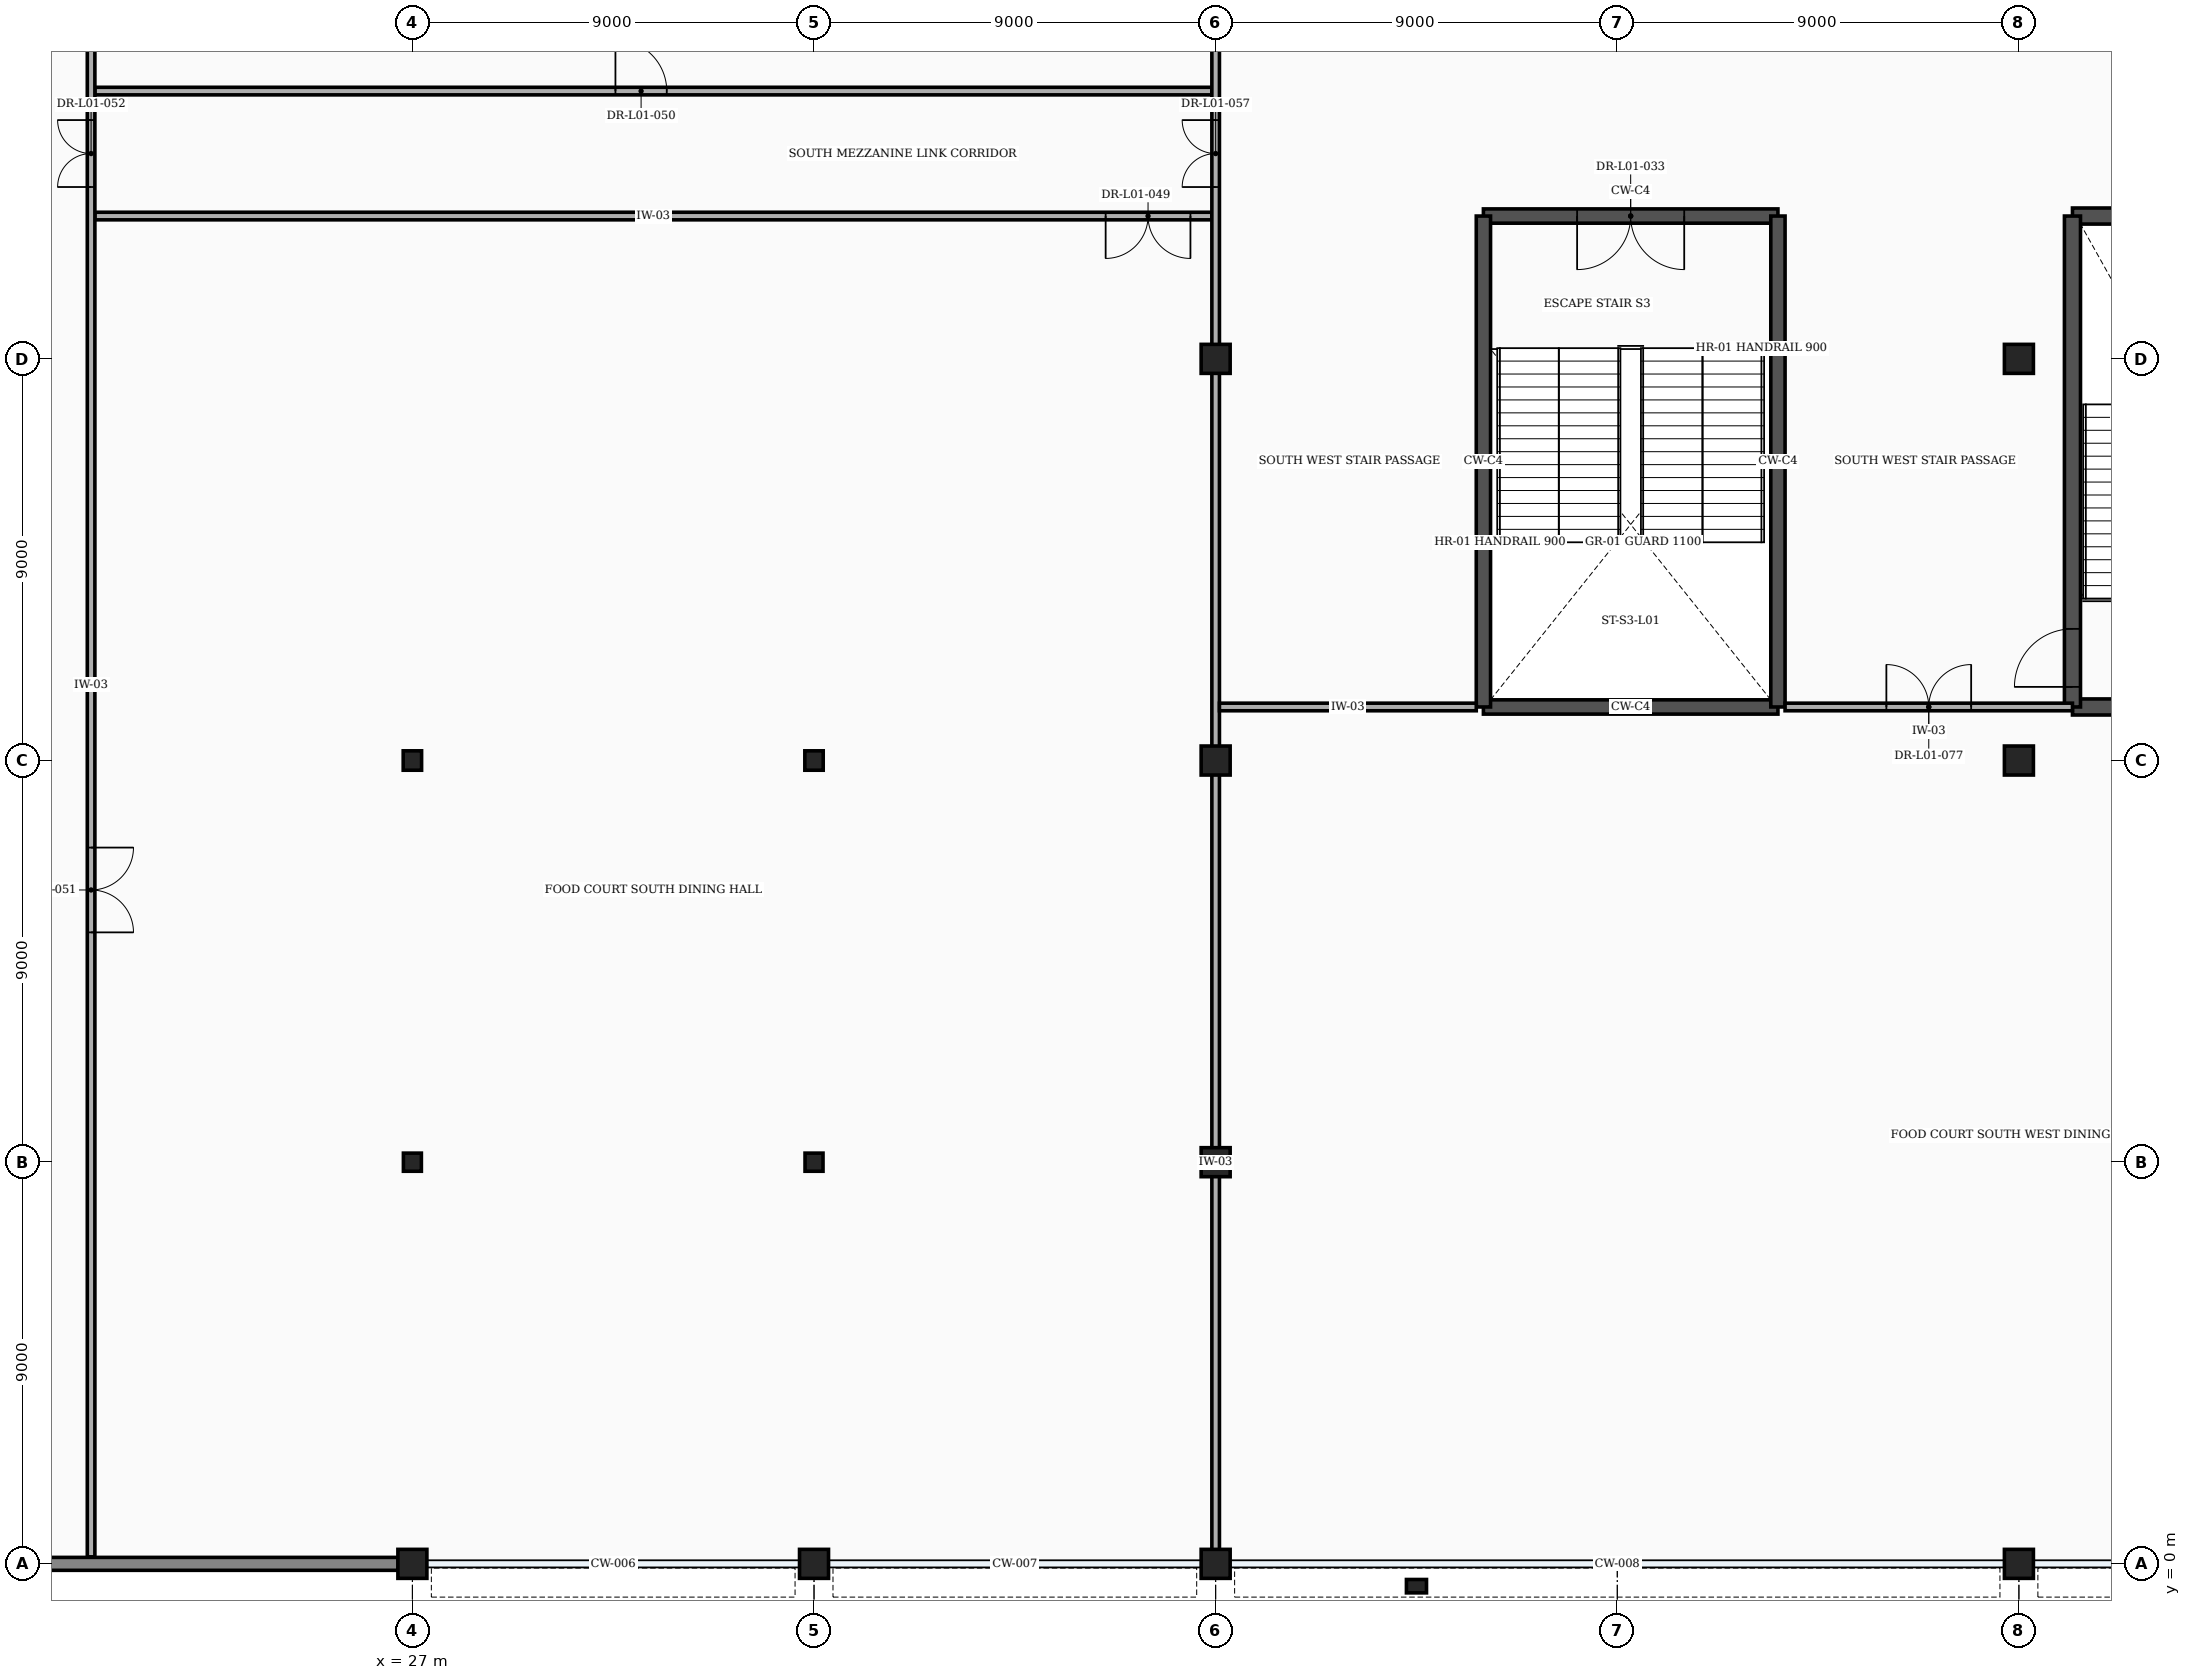
"""IFC4 building model, lengths in metres.
Left out: names, types, materials, properties, quantities, classifications, styles, units other than length and angle.
Written with IfcOpenShell. Run it as: python <this file> out.ifc"""

import sys

from ifc_helpers import new_model, si_unit, direction, frame, frame_2d, origin, origin_2d, place, context, subcontext, project, spatial, rectangle, i_section, extrude, element, fill, save


model = new_model("IFC4")
c1 = context("Model", 3, precision=1e-05, world=origin(), true_north=direction((0.0, 1.0)))
c2 = subcontext(c1, "Body", "Model", "MODEL_VIEW")
j1 = project(units=[si_unit("LENGTHUNIT", "METRE"), si_unit("PLANEANGLEUNIT", "RADIAN")], contexts=[c1])
p1 = place(None, origin())
s1 = spatial("IfcSite", under=j1, at=p1, CompositionType="ELEMENT")
p2 = place(p1, origin())
s2 = spatial("IfcBuilding", under=s1, at=p2, CompositionType="ELEMENT")
p3 = place(p2, frame((0.0, 0.0, 6.0)))
s3 = spatial("IfcBuildingStorey", under=s2, at=p3, CompositionType="ELEMENT", Elevation=6.0)
p4 = place(p3, frame((27.0, 0.0, 0.0), z_axis=(0.0, 0.0, 1.0), x_axis=(1.0, 0.0, 0.0)))
e1 = element("IfcColumn", 1, at=p4, inside=s3, PredefinedType="COLUMN", context=c2, shape_type="SweptSolid", body=[
    extrude(rectangle(XDim=0.65, YDim=0.65, at=origin_2d()), origin(), (0.0, 0.0, 1.0), 5.4),
])
p5 = place(p3, frame((27.0, 9.0, 0.0), z_axis=(0.0, 0.0, 1.0), x_axis=(1.0, 0.0, 0.0)))
e2 = element("IfcColumn", 2, at=p5, inside=s3, PredefinedType="COLUMN", context=c2, shape_type="SweptSolid", body=[
    extrude(i_section(OverallWidth=0.403, OverallDepth=0.406, WebThickness=0.027, FlangeThickness=0.043, at=origin_2d()), origin(), (0.0, 0.0, 1.0), 5.4),
])
p6 = place(p3, frame((27.0, 18.0, 0.0), z_axis=(0.0, 0.0, 1.0), x_axis=(1.0, 0.0, 0.0)))
e3 = element("IfcColumn", 3, at=p6, inside=s3, PredefinedType="COLUMN", context=c2, shape_type="SweptSolid", body=[
    extrude(i_section(OverallWidth=0.412, OverallDepth=0.435, WebThickness=0.036, FlangeThickness=0.058, at=origin_2d()), origin(), (0.0, 0.0, 1.0), 5.4),
])
p7 = place(p3, frame((36.0, 0.0, 0.0), z_axis=(0.0, 0.0, 1.0), x_axis=(1.0, 0.0, 0.0)))
e4 = element("IfcColumn", 4, at=p7, inside=s3, PredefinedType="COLUMN", context=c2, shape_type="SweptSolid", body=[
    extrude(rectangle(XDim=0.65, YDim=0.65, at=origin_2d()), origin(), (0.0, 0.0, 1.0), 5.4),
])
p8 = place(p3, frame((36.0, 9.0, 0.0), z_axis=(0.0, 0.0, 1.0), x_axis=(1.0, 0.0, 0.0)))
e5 = element("IfcColumn", 5, at=p8, inside=s3, PredefinedType="COLUMN", context=c2, shape_type="SweptSolid", body=[
    extrude(i_section(OverallWidth=0.403, OverallDepth=0.406, WebThickness=0.027, FlangeThickness=0.043, at=origin_2d()), origin(), (0.0, 0.0, 1.0), 5.4),
])
p9 = place(p3, frame((36.0, 18.0, 0.0), z_axis=(0.0, 0.0, 1.0), x_axis=(1.0, 0.0, 0.0)))
e6 = element("IfcColumn", 6, at=p9, inside=s3, PredefinedType="COLUMN", context=c2, shape_type="SweptSolid", body=[
    extrude(i_section(OverallWidth=0.412, OverallDepth=0.435, WebThickness=0.036, FlangeThickness=0.058, at=origin_2d()), origin(), (0.0, 0.0, 1.0), 5.4),
])
for number, where, z_axis, x_axis in (
    (7, (45.0, 0.0, 0.0), (0.0, 0.0, 1.0), (1.0, 0.0, 0.0)),
    (8, (45.0, 9.0, 0.0), (0.0, 0.0, 1.0), (1.0, 0.0, 0.0)),
    (9, (45.0, 18.0, 0.0), (0.0, 0.0, 1.0), (1.0, 0.0, 0.0)),
    (10, (45.0, 27.0, 0.0), (0.0, 0.0, 1.0), (1.0, 0.0, 0.0)),
    (11, (63.0, 0.0, 0.0), (0.0, 0.0, 1.0), (1.0, 0.0, 0.0)),
    (12, (63.0, 18.0, 0.0), (0.0, 0.0, 1.0), (1.0, 0.0, 0.0)),
    (13, (63.0, 27.0, 0.0), (0.0, 0.0, 1.0), (1.0, 0.0, 0.0)),
):
    element("IfcColumn", number, at=place(p3, frame(where, z_axis=z_axis, x_axis=x_axis)), inside=s3, PredefinedType="COLUMN", context=c2, shape_type="SweptSolid", body=[
        extrude(rectangle(XDim=0.65, YDim=0.65, at=origin_2d()), origin(), (0.0, 0.0, 1.0), 5.4),
    ])
p10 = place(p3, frame((49.5, -0.5, 0.0), z_axis=(0.0, 0.0, 1.0), x_axis=(1.0, 0.0, 0.0)))
e14 = element("IfcColumn", 14, at=p10, inside=s3, PredefinedType="PILASTER", context=c2, shape_type="SweptSolid", body=[
    extrude(rectangle(XDim=0.45, YDim=0.3, at=origin_2d()), origin(), (0.0, 0.0, 1.0), 5.4),
])
p11 = place(p3, frame((9.317, 0.0, 0.0), z_axis=(0.0, 0.0, 1.0), x_axis=(1.0, 0.0, 0.0)))
e15 = element("IfcWall", 15, at=p11, inside=s3, PredefinedType="STANDARD", context=c2, shape_type="SweptSolid", body=[
    extrude(rectangle(XDim=17.366, YDim=0.29, at=frame_2d((8.683, 0.0))), origin(), (0.0, 0.0, 1.0), 4.388),
])
p12 = place(p11, frame((0.65, 0.0, 0.85)))
e16 = element("IfcOpeningElement", 16, at=p12, cuts=e15, PredefinedType="OPENING", context=c2, shape_type="SweptSolid", body=[
    extrude(rectangle(XDim=2.4, YDim=2.6, at=frame_2d((1.2, 1.3))), frame((0.0, 0.157, 0.0), z_axis=(0.0, -1.0, 0.0), x_axis=(1.0, 0.0, 0.0)), (0.0, 0.0, 1.0), 0.314),
])
for number, where, z_axis, x_axis in (
    (17, (64.2, 19.2, 0.0), (0.0, 0.0, 1.0), (1.0, 0.0, 0.0)),
    (18, (64.2, 30.2, 0.0), (0.0, 0.0, 1.0), (1.0, 0.0, 0.0)),
):
    element("IfcWall", number, at=place(p3, frame(where, z_axis=z_axis, x_axis=x_axis)), inside=s3, PredefinedType="SHEAR", context=c2, shape_type="SweptSolid", body=[
        extrude(rectangle(XDim=6.6, YDim=0.36, at=frame_2d((3.3, 0.0))), origin(), (0.0, 0.0, 1.0), 5.15),
    ])
p13 = place(p3, frame((64.2, 19.2, 0.0), z_axis=(0.0, 0.0, 1.0), x_axis=(0.0, 1.0, 0.0)))
e19 = element("IfcWall", 19, at=p13, inside=s3, PredefinedType="SHEAR", context=c2, shape_type="SweptSolid", body=[
    extrude(rectangle(XDim=11.0, YDim=0.36, at=frame_2d((5.5, 0.0))), origin(), (0.0, 0.0, 1.0), 5.15),
])
p14 = place(p13, frame((0.45, 0.0, 0.0)))
e20 = element("IfcOpeningElement", 20, at=p14, cuts=e19, PredefinedType="OPENING", context=c2, shape_type="SweptSolid", body=[
    extrude(rectangle(XDim=1.3, YDim=2.2, at=frame_2d((0.65, 1.1))), frame((0.0, 0.192, 0.0), z_axis=(0.0, -1.0, 0.0), x_axis=(1.0, 0.0, 0.0)), (0.0, 0.0, 1.0), 0.384),
])
p15 = place(p3, frame((51.0, 19.2, 0.0), z_axis=(0.0, 0.0, 1.0), x_axis=(1.0, 0.0, 0.0)))
e21 = element("IfcWall", 21, at=p15, inside=s3, PredefinedType="SHEAR", context=c2, shape_type="SweptSolid", body=[
    extrude(rectangle(XDim=6.6, YDim=0.32, at=frame_2d((3.3, 0.0))), origin(), (0.0, 0.0, 1.0), 5.15),
])
p16 = place(p3, frame((51.0, 30.2, 0.0), z_axis=(0.0, 0.0, 1.0), x_axis=(1.0, 0.0, 0.0)))
e22 = element("IfcWall", 22, at=p16, inside=s3, PredefinedType="SHEAR", context=c2, shape_type="SweptSolid", body=[
    extrude(rectangle(XDim=6.6, YDim=0.32, at=frame_2d((3.3, 0.0))), origin(), (0.0, 0.0, 1.0), 5.15),
])
p17 = place(p16, frame((2.1, 0.0, 0.0)))
e23 = element("IfcOpeningElement", 23, at=p17, cuts=e22, PredefinedType="OPENING", context=c2, shape_type="SweptSolid", body=[
    extrude(rectangle(XDim=2.4, YDim=2.25, at=frame_2d((1.2, 1.125))), frame((0.0, 0.172, 0.0), z_axis=(0.0, -1.0, 0.0), x_axis=(1.0, 0.0, 0.0)), (0.0, 0.0, 1.0), 0.344),
])
for number, where, z_axis, x_axis in (
    (24, (51.0, 19.2, 0.0), (0.0, 0.0, 1.0), (0.0, 1.0, 0.0)),
    (25, (57.6, 19.2, 0.0), (0.0, 0.0, 1.0), (0.0, 1.0, 0.0)),
):
    element("IfcWall", number, at=place(p3, frame(where, z_axis=z_axis, x_axis=x_axis)), inside=s3, PredefinedType="SHEAR", context=c2, shape_type="SweptSolid", body=[
        extrude(rectangle(XDim=11.0, YDim=0.32, at=frame_2d((5.5, 0.0))), origin(), (0.0, 0.0, 1.0), 5.15),
    ])
p18 = place(p3, frame((19.885, 30.2, 0.0), z_axis=(0.0, 0.0, 1.0), x_axis=(1.0, 0.0, 0.0)))
e26 = element("IfcWall", 26, at=p18, inside=s3, PredefinedType="PARTITIONING", context=c2, shape_type="SweptSolid", body=[
    extrude(rectangle(XDim=25.03, YDim=0.17, at=frame_2d((12.515, 0.0))), origin(), (0.0, 0.0, 1.0), 5.15),
])
p19 = place(p18, frame((22.65, 0.0, 0.0)))
e27 = element("IfcOpeningElement", 27, at=p19, cuts=e26, PredefinedType="OPENING", context=c2, shape_type="SweptSolid", body=[
    extrude(rectangle(XDim=1.9, YDim=2.35, at=frame_2d((0.95, 1.175))), frame((0.0, 0.097, 0.0), z_axis=(0.0, -1.0, 0.0), x_axis=(1.0, 0.0, 0.0)), (0.0, 0.0, 1.0), 0.194),
])
p20 = place(p3, frame((19.885, 33.0, 0.0), z_axis=(0.0, 0.0, 1.0), x_axis=(1.0, 0.0, 0.0)))
e28 = element("IfcWall", 28, at=p20, inside=s3, PredefinedType="PARTITIONING", context=c2, shape_type="SweptSolid", body=[
    extrude(rectangle(XDim=25.03, YDim=0.17, at=frame_2d((12.515, 0.0))), origin(), (0.0, 0.0, 1.0), 5.15),
])
p21 = place(p20, frame((11.665, 0.0, 0.0)))
e29 = element("IfcOpeningElement", 29, at=p21, cuts=e28, PredefinedType="OPENING", context=c2, shape_type="SweptSolid", body=[
    extrude(rectangle(XDim=1.15, YDim=2.15, at=frame_2d((0.575, 1.075))), frame((0.0, 0.097, 0.0), z_axis=(0.0, -1.0, 0.0), x_axis=(1.0, 0.0, 0.0)), (0.0, 0.0, 1.0), 0.194),
])
p22 = place(p3, frame((19.8, 0.157, 0.0), z_axis=(0.0, 0.0, 1.0), x_axis=(0.0, 1.0, 0.0)))
e30 = element("IfcWall", 30, at=p22, inside=s3, PredefinedType="PARTITIONING", context=c2, shape_type="SweptSolid", body=[
    extrude(rectangle(XDim=39.083, YDim=0.17, at=frame_2d((19.541, 0.0))), origin(), (0.0, 0.0, 1.0), 5.15),
])
p23 = place(p22, frame((13.992, 0.0, 0.0)))
e31 = element("IfcOpeningElement", 31, at=p23, cuts=e30, PredefinedType="OPENING", context=c2, shape_type="SweptSolid", body=[
    extrude(rectangle(XDim=1.9, YDim=2.35, at=frame_2d((0.95, 1.175))), frame((0.0, 0.097, 0.0), z_axis=(0.0, -1.0, 0.0), x_axis=(1.0, 0.0, 0.0)), (0.0, 0.0, 1.0), 0.194),
])
p24 = place(p22, frame((30.693, 0.0, 0.0)))
e32 = element("IfcOpeningElement", 32, at=p24, cuts=e30, PredefinedType="OPENING", context=c2, shape_type="SweptSolid", body=[
    extrude(rectangle(XDim=1.5, YDim=2.2, at=frame_2d((0.75, 1.1))), frame((0.0, 0.097, 0.0), z_axis=(0.0, -1.0, 0.0), x_axis=(1.0, 0.0, 0.0)), (0.0, 0.0, 1.0), 0.194),
])
p25 = place(p3, frame((45.0, 0.22, 0.0), z_axis=(0.0, 0.0, 1.0), x_axis=(0.0, 1.0, 0.0)))
e33 = element("IfcWall", 33, at=p25, inside=s3, PredefinedType="PARTITIONING", context=c2, shape_type="SweptSolid", body=[
    extrude(rectangle(XDim=17.56, YDim=0.17, at=frame_2d((8.78, 0.0))), origin(), (0.0, 0.0, 1.0), 4.617),
])
p26 = place(p3, frame((45.0, 18.22, 0.0), z_axis=(0.0, 0.0, 1.0), x_axis=(0.0, 1.0, 0.0)))
e34 = element("IfcWall", 34, at=p26, inside=s3, PredefinedType="PARTITIONING", context=c2, shape_type="SweptSolid", body=[
    extrude(rectangle(XDim=8.56, YDim=0.17, at=frame_2d((4.28, 0.0))), origin(), (0.0, 0.0, 1.0), 4.617),
])
p27 = place(p3, frame((45.0, 27.22, 0.0), z_axis=(0.0, 0.0, 1.0), x_axis=(0.0, 1.0, 0.0)))
e35 = element("IfcWall", 35, at=p27, inside=s3, PredefinedType="PARTITIONING", context=c2, shape_type="SweptSolid", body=[
    extrude(rectangle(XDim=8.56, YDim=0.17, at=frame_2d((4.28, 0.0))), origin(), (0.0, 0.0, 1.0), 4.617),
])
p28 = place(p27, frame((3.63, 0.0, 0.0)))
e36 = element("IfcOpeningElement", 36, at=p28, cuts=e35, PredefinedType="OPENING", context=c2, shape_type="SweptSolid", body=[
    extrude(rectangle(XDim=1.5, YDim=2.2, at=frame_2d((0.75, 1.1))), frame((0.0, 0.097, 0.0), z_axis=(0.0, -1.0, 0.0), x_axis=(1.0, 0.0, 0.0)), (0.0, 0.0, 1.0), 0.194),
])
p29 = place(p3, frame((45.085, 19.2, 0.0), z_axis=(0.0, 0.0, 1.0), x_axis=(1.0, 0.0, 0.0)))
e37 = element("IfcWall", 37, at=p29, inside=s3, PredefinedType="PARTITIONING", context=c2, shape_type="SweptSolid", body=[
    extrude(rectangle(XDim=5.755, YDim=0.17, at=frame_2d((2.877, 0.0))), origin(), (0.0, 0.0, 1.0), 5.15),
])
p30 = place(p3, frame((57.76, 19.2, 0.0), z_axis=(0.0, 0.0, 1.0), x_axis=(1.0, 0.0, 0.0)))
e38 = element("IfcWall", 38, at=p30, inside=s3, PredefinedType="PARTITIONING", context=c2, shape_type="SweptSolid", body=[
    extrude(rectangle(XDim=6.44, YDim=0.17, at=frame_2d((3.22, 0.0))), origin(), (0.0, 0.0, 1.0), 5.15),
])
p31 = place(p30, frame((2.27, 0.0, 0.0)))
e39 = element("IfcOpeningElement", 39, at=p31, cuts=e38, PredefinedType="OPENING", context=c2, shape_type="SweptSolid", body=[
    extrude(rectangle(XDim=1.9, YDim=2.35, at=frame_2d((0.95, 1.175))), frame((0.0, 0.097, 0.0), z_axis=(0.0, -1.0, 0.0), x_axis=(1.0, 0.0, 0.0)), (0.0, 0.0, 1.0), 0.194),
])
p32 = place(p14, origin())
e40 = element("IfcDoor", 40, at=p32, inside=s3, OperationType="SINGLE_SWING_LEFT", PredefinedType="DOOR", context=c2, shape_type="SweptSolid", body=[
    extrude(rectangle(XDim=1.3, YDim=2.2, at=frame_2d((0.65, 1.1))), frame((0.0, 0.025, 0.0), z_axis=(0.0, -1.0, 0.0), x_axis=(1.0, 0.0, 0.0)), (0.0, 0.0, 1.0), 0.05),
])
fill(e20, e40)
p33 = place(p17, frame((2.4, 0.0, 0.0), z_axis=(0.0, 0.0, 1.0), x_axis=(-1.0, 0.0, 0.0)))
e41 = element("IfcDoor", 41, at=p33, inside=s3, OperationType="DOUBLE_DOOR_SINGLE_SWING", PredefinedType="DOOR", context=c2, shape_type="SweptSolid", body=[
    extrude(rectangle(XDim=2.4, YDim=2.25, at=frame_2d((1.2, 1.125))), frame((0.0, 0.025, 0.0), z_axis=(0.0, -1.0, 0.0), x_axis=(1.0, 0.0, 0.0)), (0.0, 0.0, 1.0), 0.05),
])
fill(e23, e41)
p34 = place(p19, frame((1.9, 0.0, 0.0), z_axis=(0.0, 0.0, 1.0), x_axis=(-1.0, 0.0, 0.0)))
e42 = element("IfcDoor", 42, at=p34, inside=s3, OperationType="DOUBLE_DOOR_SINGLE_SWING", PredefinedType="DOOR", context=c2, shape_type="SweptSolid", body=[
    extrude(rectangle(XDim=1.9, YDim=2.35, at=frame_2d((0.95, 1.175))), frame((0.0, 0.025, 0.0), z_axis=(0.0, -1.0, 0.0), x_axis=(1.0, 0.0, 0.0)), (0.0, 0.0, 1.0), 0.05),
])
fill(e27, e42)
p35 = place(p21, origin())
e43 = element("IfcDoor", 43, at=p35, inside=s3, OperationType="SINGLE_SWING_LEFT", PredefinedType="DOOR", context=c2, shape_type="SweptSolid", body=[
    extrude(rectangle(XDim=1.15, YDim=2.15, at=frame_2d((0.575, 1.075))), frame((0.0, 0.025, 0.0), z_axis=(0.0, -1.0, 0.0), x_axis=(1.0, 0.0, 0.0)), (0.0, 0.0, 1.0), 0.05),
])
fill(e29, e43)
p36 = place(p23, frame((1.9, 0.0, 0.0), z_axis=(0.0, 0.0, 1.0), x_axis=(-1.0, 0.0, 0.0)))
e44 = element("IfcDoor", 44, at=p36, inside=s3, OperationType="DOUBLE_DOOR_SINGLE_SWING", PredefinedType="DOOR", context=c2, shape_type="SweptSolid", body=[
    extrude(rectangle(XDim=1.9, YDim=2.35, at=frame_2d((0.95, 1.175))), frame((0.0, 0.025, 0.0), z_axis=(0.0, -1.0, 0.0), x_axis=(1.0, 0.0, 0.0)), (0.0, 0.0, 1.0), 0.05),
])
fill(e31, e44)
p37 = place(p24, origin())
e45 = element("IfcDoor", 45, at=p37, inside=s3, OperationType="DOUBLE_DOOR_SINGLE_SWING", PredefinedType="DOOR", context=c2, shape_type="SweptSolid", body=[
    extrude(rectangle(XDim=1.5, YDim=2.2, at=frame_2d((0.75, 1.1))), frame((0.0, 0.025, 0.0), z_axis=(0.0, -1.0, 0.0), x_axis=(1.0, 0.0, 0.0)), (0.0, 0.0, 1.0), 0.05),
])
fill(e32, e45)
p38 = place(p28, origin())
e46 = element("IfcDoor", 46, at=p38, inside=s3, OperationType="DOUBLE_DOOR_SINGLE_SWING", PredefinedType="DOOR", context=c2, shape_type="SweptSolid", body=[
    extrude(rectangle(XDim=1.5, YDim=2.2, at=frame_2d((0.75, 1.1))), frame((0.0, 0.025, 0.0), z_axis=(0.0, -1.0, 0.0), x_axis=(1.0, 0.0, 0.0)), (0.0, 0.0, 1.0), 0.05),
])
fill(e36, e46)
p39 = place(p31, origin())
e47 = element("IfcDoor", 47, at=p39, inside=s3, OperationType="DOUBLE_DOOR_SINGLE_SWING", PredefinedType="DOOR", context=c2, shape_type="SweptSolid", body=[
    extrude(rectangle(XDim=1.9, YDim=2.35, at=frame_2d((0.95, 1.175))), frame((0.0, 0.025, 0.0), z_axis=(0.0, -1.0, 0.0), x_axis=(1.0, 0.0, 0.0)), (0.0, 0.0, 1.0), 0.05),
])
fill(e39, e47)
save(model, sys.argv[1])
